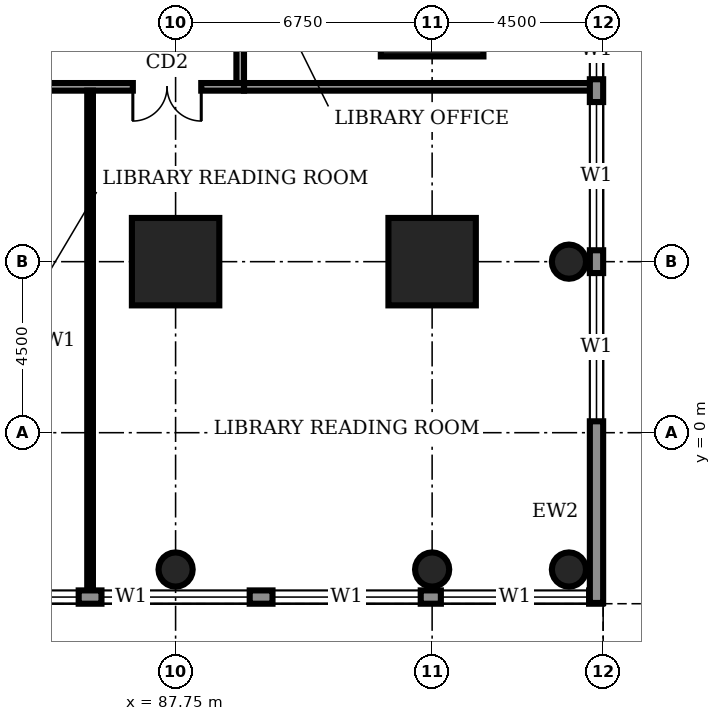
"""IFC4 building model, lengths in metres.
Left out: names, types, materials, properties, quantities, classifications, styles, units other than length and angle.
Written with IfcOpenShell. Run it as: python <this file> out.ifc"""

import sys

from ifc_helpers import new_model, si_unit, direction, frame, frame_2d, origin, origin_2d, place, context, subcontext, project, spatial, rectangle, circle, extrude, element, fill, save


model = new_model("IFC4")
c1 = context("Model", 3, precision=1e-05, world=origin(), true_north=direction((0.0, 1.0)))
c2 = subcontext(c1, "Body", "Model", "MODEL_VIEW")
j1 = project(units=[si_unit("LENGTHUNIT", "METRE"), si_unit("PLANEANGLEUNIT", "RADIAN")], contexts=[c1])
p1 = place(None, origin())
s1 = spatial("IfcSite", under=j1, at=p1, CompositionType="ELEMENT")
p2 = place(p1, origin())
s2 = spatial("IfcBuilding", under=s1, at=p2, CompositionType="ELEMENT")
p3 = place(p2, frame((0.0, 0.0, 11.0)))
s3 = spatial("IfcBuildingStorey", under=s2, at=p3, CompositionType="ELEMENT", Elevation=11.0)
for number, where, z_axis, x_axis in (
    (1, (87.75, 4.5, 0.0), (0.0, 0.0, 1.0), (1.0, 0.0, 0.0)),
    (2, (94.5, 4.5, 0.0), (0.0, 0.0, 1.0), (1.0, 0.0, 0.0)),
):
    element("IfcColumn", number, at=place(p3, frame(where, z_axis=z_axis, x_axis=x_axis)), inside=s3, PredefinedType="COLUMN", context=c2, shape_type="SweptSolid", body=[
        extrude(rectangle(XDim=2.3, YDim=2.3, at=origin_2d()), origin(), (0.0, 0.0, 1.0), 5.0),
    ])
p4 = place(p3, frame((94.5, 11.25, 0.0), z_axis=(0.0, 0.0, 1.0), x_axis=(1.0, 0.0, 0.0)))
e3 = element("IfcColumn", 3, at=p4, inside=s3, PredefinedType="COLUMN", context=c2, shape_type="SweptSolid", body=[
    extrude(rectangle(XDim=2.7, YDim=2.7, at=origin_2d()), origin(), (0.0, 0.0, 1.0), 5.0),
])
for number, where, z_axis, x_axis in (
    (4, (87.75, -3.6, 0.0), (0.0, 0.0, 1.0), (1.0, 0.0, 0.0)),
    (5, (94.5, -3.6, 0.0), (0.0, 0.0, 1.0), (1.0, 0.0, 0.0)),
    (6, (98.1, -3.6, 0.0), (0.0, 0.0, 1.0), (1.0, 0.0, 0.0)),
    (7, (98.1, 4.5, 0.0), (0.0, 0.0, 1.0), (1.0, 0.0, 0.0)),
):
    element("IfcColumn", number, at=place(p3, frame(where, z_axis=z_axis, x_axis=x_axis)), inside=s3, PredefinedType="COLUMN", context=c2, shape_type="SweptSolid", body=[
        extrude(circle(Radius=0.45, at=origin_2d()), origin(), (0.0, 0.0, 1.0), 5.0),
    ])
p5 = place(p3, frame((0.02, -4.325, 0.0), z_axis=(0.0, 0.0, 1.0), x_axis=(1.0, 0.0, 0.0)))
e8 = element("IfcWall", 8, at=p5, inside=s3, PredefinedType="STANDARD", context=c2, shape_type="SweptSolid", body=[
    extrude(rectangle(XDim=98.96, YDim=0.35, at=frame_2d((49.48, 0.0))), origin(), (0.0, 0.0, 1.0), 4.7),
])
p6 = place(p5, frame((4.78, 0.0, 0.9)))
e9 = element("IfcOpeningElement", 9, at=p6, cuts=e8, PredefinedType="OPENING", context=c2, shape_type="SweptSolid", body=[
    extrude(rectangle(XDim=3.9, YDim=2.2, at=frame_2d((1.95, 1.1))), frame((0.0, 0.185, 0.0), z_axis=(0.0, -1.0, 0.0), x_axis=(1.0, 0.0, 0.0)), (0.0, 0.0, 1.0), 0.37),
])
p7 = place(p5, frame((9.28, 0.0, 0.9)))
e10 = element("IfcOpeningElement", 10, at=p7, cuts=e8, PredefinedType="OPENING", context=c2, shape_type="SweptSolid", body=[
    extrude(rectangle(XDim=3.9, YDim=2.2, at=frame_2d((1.95, 1.1))), frame((0.0, 0.185, 0.0), z_axis=(0.0, -1.0, 0.0), x_axis=(1.0, 0.0, 0.0)), (0.0, 0.0, 1.0), 0.37),
])
p8 = place(p5, frame((13.78, 0.0, 0.9)))
e11 = element("IfcOpeningElement", 11, at=p8, cuts=e8, PredefinedType="OPENING", context=c2, shape_type="SweptSolid", body=[
    extrude(rectangle(XDim=3.9, YDim=2.2, at=frame_2d((1.95, 1.1))), frame((0.0, 0.185, 0.0), z_axis=(0.0, -1.0, 0.0), x_axis=(1.0, 0.0, 0.0)), (0.0, 0.0, 1.0), 0.37),
])
p9 = place(p5, frame((18.28, 0.0, 0.9)))
e12 = element("IfcOpeningElement", 12, at=p9, cuts=e8, PredefinedType="OPENING", context=c2, shape_type="SweptSolid", body=[
    extrude(rectangle(XDim=3.9, YDim=2.2, at=frame_2d((1.95, 1.1))), frame((0.0, 0.185, 0.0), z_axis=(0.0, -1.0, 0.0), x_axis=(1.0, 0.0, 0.0)), (0.0, 0.0, 1.0), 0.37),
])
p10 = place(p5, frame((22.78, 0.0, 0.9)))
e13 = element("IfcOpeningElement", 13, at=p10, cuts=e8, PredefinedType="OPENING", context=c2, shape_type="SweptSolid", body=[
    extrude(rectangle(XDim=3.9, YDim=2.2, at=frame_2d((1.95, 1.1))), frame((0.0, 0.185, 0.0), z_axis=(0.0, -1.0, 0.0), x_axis=(1.0, 0.0, 0.0)), (0.0, 0.0, 1.0), 0.37),
])
p11 = place(p5, frame((27.28, 0.0, 0.9)))
e14 = element("IfcOpeningElement", 14, at=p11, cuts=e8, PredefinedType="OPENING", context=c2, shape_type="SweptSolid", body=[
    extrude(rectangle(XDim=3.9, YDim=2.2, at=frame_2d((1.95, 1.1))), frame((0.0, 0.185, 0.0), z_axis=(0.0, -1.0, 0.0), x_axis=(1.0, 0.0, 0.0)), (0.0, 0.0, 1.0), 0.37),
])
p12 = place(p5, frame((31.78, 0.0, 0.9)))
e15 = element("IfcOpeningElement", 15, at=p12, cuts=e8, PredefinedType="OPENING", context=c2, shape_type="SweptSolid", body=[
    extrude(rectangle(XDim=3.9, YDim=2.2, at=frame_2d((1.95, 1.1))), frame((0.0, 0.185, 0.0), z_axis=(0.0, -1.0, 0.0), x_axis=(1.0, 0.0, 0.0)), (0.0, 0.0, 1.0), 0.37),
])
p13 = place(p5, frame((36.28, 0.0, 0.9)))
e16 = element("IfcOpeningElement", 16, at=p13, cuts=e8, PredefinedType="OPENING", context=c2, shape_type="SweptSolid", body=[
    extrude(rectangle(XDim=3.9, YDim=2.2, at=frame_2d((1.95, 1.1))), frame((0.0, 0.185, 0.0), z_axis=(0.0, -1.0, 0.0), x_axis=(1.0, 0.0, 0.0)), (0.0, 0.0, 1.0), 0.37),
])
p14 = place(p5, frame((40.78, 0.0, 0.9)))
e17 = element("IfcOpeningElement", 17, at=p14, cuts=e8, PredefinedType="OPENING", context=c2, shape_type="SweptSolid", body=[
    extrude(rectangle(XDim=3.9, YDim=2.2, at=frame_2d((1.95, 1.1))), frame((0.0, 0.185, 0.0), z_axis=(0.0, -1.0, 0.0), x_axis=(1.0, 0.0, 0.0)), (0.0, 0.0, 1.0), 0.37),
])
p15 = place(p5, frame((45.28, 0.0, 0.9)))
e18 = element("IfcOpeningElement", 18, at=p15, cuts=e8, PredefinedType="OPENING", context=c2, shape_type="SweptSolid", body=[
    extrude(rectangle(XDim=3.9, YDim=2.2, at=frame_2d((1.95, 1.1))), frame((0.0, 0.185, 0.0), z_axis=(0.0, -1.0, 0.0), x_axis=(1.0, 0.0, 0.0)), (0.0, 0.0, 1.0), 0.37),
])
p16 = place(p5, frame((49.78, 0.0, 0.9)))
e19 = element("IfcOpeningElement", 19, at=p16, cuts=e8, PredefinedType="OPENING", context=c2, shape_type="SweptSolid", body=[
    extrude(rectangle(XDim=3.9, YDim=2.2, at=frame_2d((1.95, 1.1))), frame((0.0, 0.185, 0.0), z_axis=(0.0, -1.0, 0.0), x_axis=(1.0, 0.0, 0.0)), (0.0, 0.0, 1.0), 0.37),
])
p17 = place(p5, frame((54.28, 0.0, 0.9)))
e20 = element("IfcOpeningElement", 20, at=p17, cuts=e8, PredefinedType="OPENING", context=c2, shape_type="SweptSolid", body=[
    extrude(rectangle(XDim=3.9, YDim=2.2, at=frame_2d((1.95, 1.1))), frame((0.0, 0.185, 0.0), z_axis=(0.0, -1.0, 0.0), x_axis=(1.0, 0.0, 0.0)), (0.0, 0.0, 1.0), 0.37),
])
p18 = place(p5, frame((58.78, 0.0, 0.9)))
e21 = element("IfcOpeningElement", 21, at=p18, cuts=e8, PredefinedType="OPENING", context=c2, shape_type="SweptSolid", body=[
    extrude(rectangle(XDim=3.9, YDim=2.2, at=frame_2d((1.95, 1.1))), frame((0.0, 0.185, 0.0), z_axis=(0.0, -1.0, 0.0), x_axis=(1.0, 0.0, 0.0)), (0.0, 0.0, 1.0), 0.37),
])
p19 = place(p5, frame((63.28, 0.0, 0.9)))
e22 = element("IfcOpeningElement", 22, at=p19, cuts=e8, PredefinedType="OPENING", context=c2, shape_type="SweptSolid", body=[
    extrude(rectangle(XDim=3.9, YDim=2.2, at=frame_2d((1.95, 1.1))), frame((0.0, 0.185, 0.0), z_axis=(0.0, -1.0, 0.0), x_axis=(1.0, 0.0, 0.0)), (0.0, 0.0, 1.0), 0.37),
])
p20 = place(p5, frame((67.78, 0.0, 0.9)))
e23 = element("IfcOpeningElement", 23, at=p20, cuts=e8, PredefinedType="OPENING", context=c2, shape_type="SweptSolid", body=[
    extrude(rectangle(XDim=3.9, YDim=2.2, at=frame_2d((1.95, 1.1))), frame((0.0, 0.185, 0.0), z_axis=(0.0, -1.0, 0.0), x_axis=(1.0, 0.0, 0.0)), (0.0, 0.0, 1.0), 0.37),
])
p21 = place(p5, frame((72.28, 0.0, 0.9)))
e24 = element("IfcOpeningElement", 24, at=p21, cuts=e8, PredefinedType="OPENING", context=c2, shape_type="SweptSolid", body=[
    extrude(rectangle(XDim=3.9, YDim=2.2, at=frame_2d((1.95, 1.1))), frame((0.0, 0.185, 0.0), z_axis=(0.0, -1.0, 0.0), x_axis=(1.0, 0.0, 0.0)), (0.0, 0.0, 1.0), 0.37),
])
p22 = place(p5, frame((76.78, 0.0, 0.9)))
e25 = element("IfcOpeningElement", 25, at=p22, cuts=e8, PredefinedType="OPENING", context=c2, shape_type="SweptSolid", body=[
    extrude(rectangle(XDim=3.9, YDim=2.2, at=frame_2d((1.95, 1.1))), frame((0.0, 0.185, 0.0), z_axis=(0.0, -1.0, 0.0), x_axis=(1.0, 0.0, 0.0)), (0.0, 0.0, 1.0), 0.37),
])
p23 = place(p5, frame((81.28, 0.0, 0.9)))
e26 = element("IfcOpeningElement", 26, at=p23, cuts=e8, PredefinedType="OPENING", context=c2, shape_type="SweptSolid", body=[
    extrude(rectangle(XDim=3.9, YDim=2.2, at=frame_2d((1.95, 1.1))), frame((0.0, 0.185, 0.0), z_axis=(0.0, -1.0, 0.0), x_axis=(1.0, 0.0, 0.0)), (0.0, 0.0, 1.0), 0.37),
])
p24 = place(p5, frame((85.78, 0.0, 0.9)))
e27 = element("IfcOpeningElement", 27, at=p24, cuts=e8, PredefinedType="OPENING", context=c2, shape_type="SweptSolid", body=[
    extrude(rectangle(XDim=3.9, YDim=2.2, at=frame_2d((1.95, 1.1))), frame((0.0, 0.185, 0.0), z_axis=(0.0, -1.0, 0.0), x_axis=(1.0, 0.0, 0.0)), (0.0, 0.0, 1.0), 0.37),
])
p25 = place(p5, frame((90.28, 0.0, 0.9)))
e28 = element("IfcOpeningElement", 28, at=p25, cuts=e8, PredefinedType="OPENING", context=c2, shape_type="SweptSolid", body=[
    extrude(rectangle(XDim=3.9, YDim=2.2, at=frame_2d((1.95, 1.1))), frame((0.0, 0.185, 0.0), z_axis=(0.0, -1.0, 0.0), x_axis=(1.0, 0.0, 0.0)), (0.0, 0.0, 1.0), 0.37),
])
p26 = place(p5, frame((94.71, 0.0, 0.9)))
e29 = element("IfcOpeningElement", 29, at=p26, cuts=e8, PredefinedType="OPENING", context=c2, shape_type="SweptSolid", body=[
    extrude(rectangle(XDim=3.9, YDim=2.2, at=frame_2d((1.95, 1.1))), frame((0.0, 0.185, 0.0), z_axis=(0.0, -1.0, 0.0), x_axis=(1.0, 0.0, 0.0)), (0.0, 0.0, 1.0), 0.37),
])
p27 = place(p3, frame((98.825, -4.48, 0.0), z_axis=(0.0, 0.0, 1.0), x_axis=(0.0, 1.0, 0.0)))
e30 = element("IfcWall", 30, at=p27, inside=s3, PredefinedType="STANDARD", context=c2, shape_type="SweptSolid", body=[
    extrude(rectangle(XDim=53.96, YDim=0.35, at=frame_2d((26.98, 0.0))), origin(), (0.0, 0.0, 1.0), 4.7),
])
p28 = place(p27, frame((4.78, 0.0, 0.9)))
e31 = element("IfcOpeningElement", 31, at=p28, cuts=e30, PredefinedType="OPENING", context=c2, shape_type="SweptSolid", body=[
    extrude(rectangle(XDim=3.9, YDim=2.2, at=frame_2d((1.95, 1.1))), frame((0.0, 0.185, 0.0), z_axis=(0.0, -1.0, 0.0), x_axis=(1.0, 0.0, 0.0)), (0.0, 0.0, 1.0), 0.37),
])
p29 = place(p27, frame((9.28, 0.0, 0.9)))
e32 = element("IfcOpeningElement", 32, at=p29, cuts=e30, PredefinedType="OPENING", context=c2, shape_type="SweptSolid", body=[
    extrude(rectangle(XDim=3.9, YDim=2.2, at=frame_2d((1.95, 1.1))), frame((0.0, 0.185, 0.0), z_axis=(0.0, -1.0, 0.0), x_axis=(1.0, 0.0, 0.0)), (0.0, 0.0, 1.0), 0.37),
])
p30 = place(p27, frame((13.78, 0.0, 0.9)))
e33 = element("IfcOpeningElement", 33, at=p30, cuts=e30, PredefinedType="OPENING", context=c2, shape_type="SweptSolid", body=[
    extrude(rectangle(XDim=3.9, YDim=2.2, at=frame_2d((1.95, 1.1))), frame((0.0, 0.185, 0.0), z_axis=(0.0, -1.0, 0.0), x_axis=(1.0, 0.0, 0.0)), (0.0, 0.0, 1.0), 0.37),
])
p31 = place(p27, frame((18.28, 0.0, 0.9)))
e34 = element("IfcOpeningElement", 34, at=p31, cuts=e30, PredefinedType="OPENING", context=c2, shape_type="SweptSolid", body=[
    extrude(rectangle(XDim=3.9, YDim=2.2, at=frame_2d((1.95, 1.1))), frame((0.0, 0.185, 0.0), z_axis=(0.0, -1.0, 0.0), x_axis=(1.0, 0.0, 0.0)), (0.0, 0.0, 1.0), 0.37),
])
p32 = place(p27, frame((22.78, 0.0, 0.9)))
e35 = element("IfcOpeningElement", 35, at=p32, cuts=e30, PredefinedType="OPENING", context=c2, shape_type="SweptSolid", body=[
    extrude(rectangle(XDim=3.9, YDim=2.2, at=frame_2d((1.95, 1.1))), frame((0.0, 0.185, 0.0), z_axis=(0.0, -1.0, 0.0), x_axis=(1.0, 0.0, 0.0)), (0.0, 0.0, 1.0), 0.37),
])
p33 = place(p27, frame((27.28, 0.0, 0.9)))
e36 = element("IfcOpeningElement", 36, at=p33, cuts=e30, PredefinedType="OPENING", context=c2, shape_type="SweptSolid", body=[
    extrude(rectangle(XDim=3.9, YDim=2.2, at=frame_2d((1.95, 1.1))), frame((0.0, 0.185, 0.0), z_axis=(0.0, -1.0, 0.0), x_axis=(1.0, 0.0, 0.0)), (0.0, 0.0, 1.0), 0.37),
])
p34 = place(p27, frame((31.78, 0.0, 0.9)))
e37 = element("IfcOpeningElement", 37, at=p34, cuts=e30, PredefinedType="OPENING", context=c2, shape_type="SweptSolid", body=[
    extrude(rectangle(XDim=3.9, YDim=2.2, at=frame_2d((1.95, 1.1))), frame((0.0, 0.185, 0.0), z_axis=(0.0, -1.0, 0.0), x_axis=(1.0, 0.0, 0.0)), (0.0, 0.0, 1.0), 0.37),
])
p35 = place(p27, frame((36.28, 0.0, 0.9)))
e38 = element("IfcOpeningElement", 38, at=p35, cuts=e30, PredefinedType="OPENING", context=c2, shape_type="SweptSolid", body=[
    extrude(rectangle(XDim=3.9, YDim=2.2, at=frame_2d((1.95, 1.1))), frame((0.0, 0.185, 0.0), z_axis=(0.0, -1.0, 0.0), x_axis=(1.0, 0.0, 0.0)), (0.0, 0.0, 1.0), 0.37),
])
p36 = place(p27, frame((40.78, 0.0, 0.9)))
e39 = element("IfcOpeningElement", 39, at=p36, cuts=e30, PredefinedType="OPENING", context=c2, shape_type="SweptSolid", body=[
    extrude(rectangle(XDim=3.9, YDim=2.2, at=frame_2d((1.95, 1.1))), frame((0.0, 0.185, 0.0), z_axis=(0.0, -1.0, 0.0), x_axis=(1.0, 0.0, 0.0)), (0.0, 0.0, 1.0), 0.37),
])
p37 = place(p27, frame((45.28, 0.0, 0.9)))
e40 = element("IfcOpeningElement", 40, at=p37, cuts=e30, PredefinedType="OPENING", context=c2, shape_type="SweptSolid", body=[
    extrude(rectangle(XDim=3.9, YDim=2.2, at=frame_2d((1.95, 1.1))), frame((0.0, 0.185, 0.0), z_axis=(0.0, -1.0, 0.0), x_axis=(1.0, 0.0, 0.0)), (0.0, 0.0, 1.0), 0.37),
])
p38 = place(p27, frame((49.71, 0.0, 0.9)))
e41 = element("IfcOpeningElement", 41, at=p38, cuts=e30, PredefinedType="OPENING", context=c2, shape_type="SweptSolid", body=[
    extrude(rectangle(XDim=3.9, YDim=2.2, at=frame_2d((1.95, 1.1))), frame((0.0, 0.185, 0.0), z_axis=(0.0, -1.0, 0.0), x_axis=(1.0, 0.0, 0.0)), (0.0, 0.0, 1.0), 0.37),
])
p39 = place(p3, frame((72.65, 9.1, 0.0), z_axis=(0.0, 0.0, 1.0), x_axis=(1.0, 0.0, 0.0)))
e42 = element("IfcWall", 42, at=p39, inside=s3, PredefinedType="SOLIDWALL", context=c2, shape_type="SweptSolid", body=[
    extrude(rectangle(XDim=16.9, YDim=0.2, at=frame_2d((8.45, 0.0))), origin(), (0.0, 0.0, 1.0), 4.7),
])
p40 = place(p39, frame((3.175, 0.0, 0.0)))
e43 = element("IfcOpeningElement", 43, at=p40, cuts=e42, PredefinedType="OPENING", context=c2, shape_type="SweptSolid", body=[
    extrude(rectangle(XDim=1.8, YDim=2.1, at=frame_2d((0.9, 1.05))), frame((0.0, 0.11, 0.0), z_axis=(0.0, -1.0, 0.0), x_axis=(1.0, 0.0, 0.0)), (0.0, 0.0, 1.0), 0.22),
])
p41 = place(p39, frame((10.1, 0.0, 0.0)))
e44 = element("IfcOpeningElement", 44, at=p41, cuts=e42, PredefinedType="OPENING", context=c2, shape_type="SweptSolid", body=[
    extrude(rectangle(XDim=1.0, YDim=2.1, at=frame_2d((0.5, 1.05))), frame((0.0, 0.11, 0.0), z_axis=(0.0, -1.0, 0.0), x_axis=(1.0, 0.0, 0.0)), (0.0, 0.0, 1.0), 0.22),
])
p42 = place(p39, frame((13.975, 0.0, 0.0)))
e45 = element("IfcOpeningElement", 45, at=p42, cuts=e42, PredefinedType="OPENING", context=c2, shape_type="SweptSolid", body=[
    extrude(rectangle(XDim=1.8, YDim=2.1, at=frame_2d((0.9, 1.05))), frame((0.0, 0.11, 0.0), z_axis=(0.0, -1.0, 0.0), x_axis=(1.0, 0.0, 0.0)), (0.0, 0.0, 1.0), 0.22),
])
p43 = place(p3, frame((89.45, 9.2, 0.0), z_axis=(0.0, 0.0, 1.0), x_axis=(0.0, 1.0, 0.0)))
e46 = element("IfcWall", 46, at=p43, inside=s3, PredefinedType="SOLIDWALL", context=c2, shape_type="SweptSolid", body=[
    extrude(rectangle(XDim=22.3, YDim=0.2, at=frame_2d((11.15, 0.0))), origin(), (0.0, 0.0, 1.0), 4.7),
])
p44 = place(p43, frame((1.55, 0.0, 0.0)))
e47 = element("IfcOpeningElement", 47, at=p44, cuts=e46, PredefinedType="OPENING", context=c2, shape_type="SweptSolid", body=[
    extrude(rectangle(XDim=1.0, YDim=2.1, at=frame_2d((0.5, 1.05))), frame((0.0, 0.11, 0.0), z_axis=(0.0, -1.0, 0.0), x_axis=(1.0, 0.0, 0.0)), (0.0, 0.0, 1.0), 0.22),
])
p45 = place(p43, frame((5.75, 0.0, 0.0)))
e48 = element("IfcOpeningElement", 48, at=p45, cuts=e46, PredefinedType="OPENING", context=c2, shape_type="SweptSolid", body=[
    extrude(rectangle(XDim=0.9, YDim=2.1, at=frame_2d((0.45, 1.05))), frame((0.0, 0.11, 0.0), z_axis=(0.0, -1.0, 0.0), x_axis=(1.0, 0.0, 0.0)), (0.0, 0.0, 1.0), 0.22),
])
p46 = place(p43, frame((8.75, 0.0, 0.0)))
e49 = element("IfcOpeningElement", 49, at=p46, cuts=e46, PredefinedType="OPENING", context=c2, shape_type="SweptSolid", body=[
    extrude(rectangle(XDim=0.9, YDim=2.1, at=frame_2d((0.45, 1.05))), frame((0.0, 0.11, 0.0), z_axis=(0.0, -1.0, 0.0), x_axis=(1.0, 0.0, 0.0)), (0.0, 0.0, 1.0), 0.22),
])
p47 = place(p43, frame((13.6, 0.0, 0.0)))
e50 = element("IfcOpeningElement", 50, at=p47, cuts=e46, PredefinedType="OPENING", context=c2, shape_type="SweptSolid", body=[
    extrude(rectangle(XDim=0.9, YDim=2.1, at=frame_2d((0.45, 1.05))), frame((0.0, 0.11, 0.0), z_axis=(0.0, -1.0, 0.0), x_axis=(1.0, 0.0, 0.0)), (0.0, 0.0, 1.0), 0.22),
])
p48 = place(p43, frame((16.3, 0.0, 0.0)))
e51 = element("IfcOpeningElement", 51, at=p48, cuts=e46, PredefinedType="OPENING", context=c2, shape_type="SweptSolid", body=[
    extrude(rectangle(XDim=1.0, YDim=2.1, at=frame_2d((0.5, 1.05))), frame((0.0, 0.11, 0.0), z_axis=(0.0, -1.0, 0.0), x_axis=(1.0, 0.0, 0.0)), (0.0, 0.0, 1.0), 0.22),
])
p49 = place(p43, frame((10.8, 0.0, 0.0)))
e52 = element("IfcOpeningElement", 52, at=p49, cuts=e46, PredefinedType="OPENING", context=c2, shape_type="SweptSolid", body=[
    extrude(rectangle(XDim=1.0, YDim=2.1, at=frame_2d((0.5, 1.05))), frame((0.0, 0.11, 0.0), z_axis=(0.0, -1.0, 0.0), x_axis=(1.0, 0.0, 0.0)), (0.0, 0.0, 1.0), 0.22),
])
p50 = place(p43, frame((19.55, 0.0, 0.0)))
e53 = element("IfcOpeningElement", 53, at=p50, cuts=e46, PredefinedType="OPENING", context=c2, shape_type="SweptSolid", body=[
    extrude(rectangle(XDim=1.0, YDim=2.1, at=frame_2d((0.5, 1.05))), frame((0.0, 0.11, 0.0), z_axis=(0.0, -1.0, 0.0), x_axis=(1.0, 0.0, 0.0)), (0.0, 0.0, 1.0), 0.22),
])
p51 = place(p3, frame((89.55, 9.1, 0.0), z_axis=(0.0, 0.0, 1.0), x_axis=(1.0, 0.0, 0.0)))
e54 = element("IfcWall", 54, at=p51, inside=s3, PredefinedType="SOLIDWALL", context=c2, shape_type="SweptSolid", body=[
    extrude(rectangle(XDim=9.15, YDim=0.2, at=frame_2d((4.575, 0.0))), origin(), (0.0, 0.0, 1.0), 4.7),
])
p52 = place(p3, frame((85.5, -4.2, 0.0), z_axis=(0.0, 0.0, 1.0), x_axis=(0.0, 1.0, 0.0)))
e55 = element("IfcWall", 55, at=p52, inside=s3, PredefinedType="PARTITIONING", context=c2, shape_type="SweptSolid", body=[
    extrude(rectangle(XDim=13.2, YDim=0.15, at=frame_2d((6.6, 0.0))), origin(), (0.0, 0.0, 1.0), 4.7),
])
p53 = place(p23, origin())
e56 = element("IfcWindow", 56, at=p53, inside=s3, PartitioningType="SINGLE_PANEL", PredefinedType="WINDOW", context=c2, shape_type="SweptSolid", body=[
    extrude(rectangle(XDim=3.9, YDim=2.2, at=frame_2d((1.95, 1.1))), frame((0.0, 0.03, 0.0), z_axis=(0.0, -1.0, 0.0), x_axis=(1.0, 0.0, 0.0)), (0.0, 0.0, 1.0), 0.06),
])
fill(e26, e56)
p54 = place(p24, origin())
e57 = element("IfcWindow", 57, at=p54, inside=s3, PartitioningType="SINGLE_PANEL", PredefinedType="WINDOW", context=c2, shape_type="SweptSolid", body=[
    extrude(rectangle(XDim=3.9, YDim=2.2, at=frame_2d((1.95, 1.1))), frame((0.0, 0.03, 0.0), z_axis=(0.0, -1.0, 0.0), x_axis=(1.0, 0.0, 0.0)), (0.0, 0.0, 1.0), 0.06),
])
fill(e27, e57)
p55 = place(p25, origin())
e58 = element("IfcWindow", 58, at=p55, inside=s3, PartitioningType="SINGLE_PANEL", PredefinedType="WINDOW", context=c2, shape_type="SweptSolid", body=[
    extrude(rectangle(XDim=3.9, YDim=2.2, at=frame_2d((1.95, 1.1))), frame((0.0, 0.03, 0.0), z_axis=(0.0, -1.0, 0.0), x_axis=(1.0, 0.0, 0.0)), (0.0, 0.0, 1.0), 0.06),
])
fill(e28, e58)
p56 = place(p26, origin())
e59 = element("IfcWindow", 59, at=p56, inside=s3, PartitioningType="SINGLE_PANEL", PredefinedType="WINDOW", context=c2, shape_type="SweptSolid", body=[
    extrude(rectangle(XDim=3.9, YDim=2.2, at=frame_2d((1.95, 1.1))), frame((0.0, 0.03, 0.0), z_axis=(0.0, -1.0, 0.0), x_axis=(1.0, 0.0, 0.0)), (0.0, 0.0, 1.0), 0.06),
])
fill(e29, e59)
p57 = place(p28, origin())
e60 = element("IfcWindow", 60, at=p57, inside=s3, PartitioningType="SINGLE_PANEL", PredefinedType="WINDOW", context=c2, shape_type="SweptSolid", body=[
    extrude(rectangle(XDim=3.9, YDim=2.2, at=frame_2d((1.95, 1.1))), frame((0.0, 0.03, 0.0), z_axis=(0.0, -1.0, 0.0), x_axis=(1.0, 0.0, 0.0)), (0.0, 0.0, 1.0), 0.06),
])
fill(e31, e60)
p58 = place(p29, origin())
e61 = element("IfcWindow", 61, at=p58, inside=s3, PartitioningType="SINGLE_PANEL", PredefinedType="WINDOW", context=c2, shape_type="SweptSolid", body=[
    extrude(rectangle(XDim=3.9, YDim=2.2, at=frame_2d((1.95, 1.1))), frame((0.0, 0.03, 0.0), z_axis=(0.0, -1.0, 0.0), x_axis=(1.0, 0.0, 0.0)), (0.0, 0.0, 1.0), 0.06),
])
fill(e32, e61)
p59 = place(p30, origin())
e62 = element("IfcWindow", 62, at=p59, inside=s3, PartitioningType="SINGLE_PANEL", PredefinedType="WINDOW", context=c2, shape_type="SweptSolid", body=[
    extrude(rectangle(XDim=3.9, YDim=2.2, at=frame_2d((1.95, 1.1))), frame((0.0, 0.03, 0.0), z_axis=(0.0, -1.0, 0.0), x_axis=(1.0, 0.0, 0.0)), (0.0, 0.0, 1.0), 0.06),
])
fill(e33, e62)
p60 = place(p42, frame((1.8, 0.0, 0.0), z_axis=(0.0, 0.0, 1.0), x_axis=(-1.0, 0.0, 0.0)))
e63 = element("IfcDoor", 63, at=p60, inside=s3, OperationType="DOUBLE_DOOR_SINGLE_SWING", PredefinedType="DOOR", context=c2, shape_type="SweptSolid", body=[
    extrude(rectangle(XDim=1.8, YDim=2.1, at=frame_2d((0.9, 1.05))), frame((0.0, 0.025, 0.0), z_axis=(0.0, -1.0, 0.0), x_axis=(1.0, 0.0, 0.0)), (0.0, 0.0, 1.0), 0.05),
])
fill(e45, e63)
save(model, sys.argv[1])
